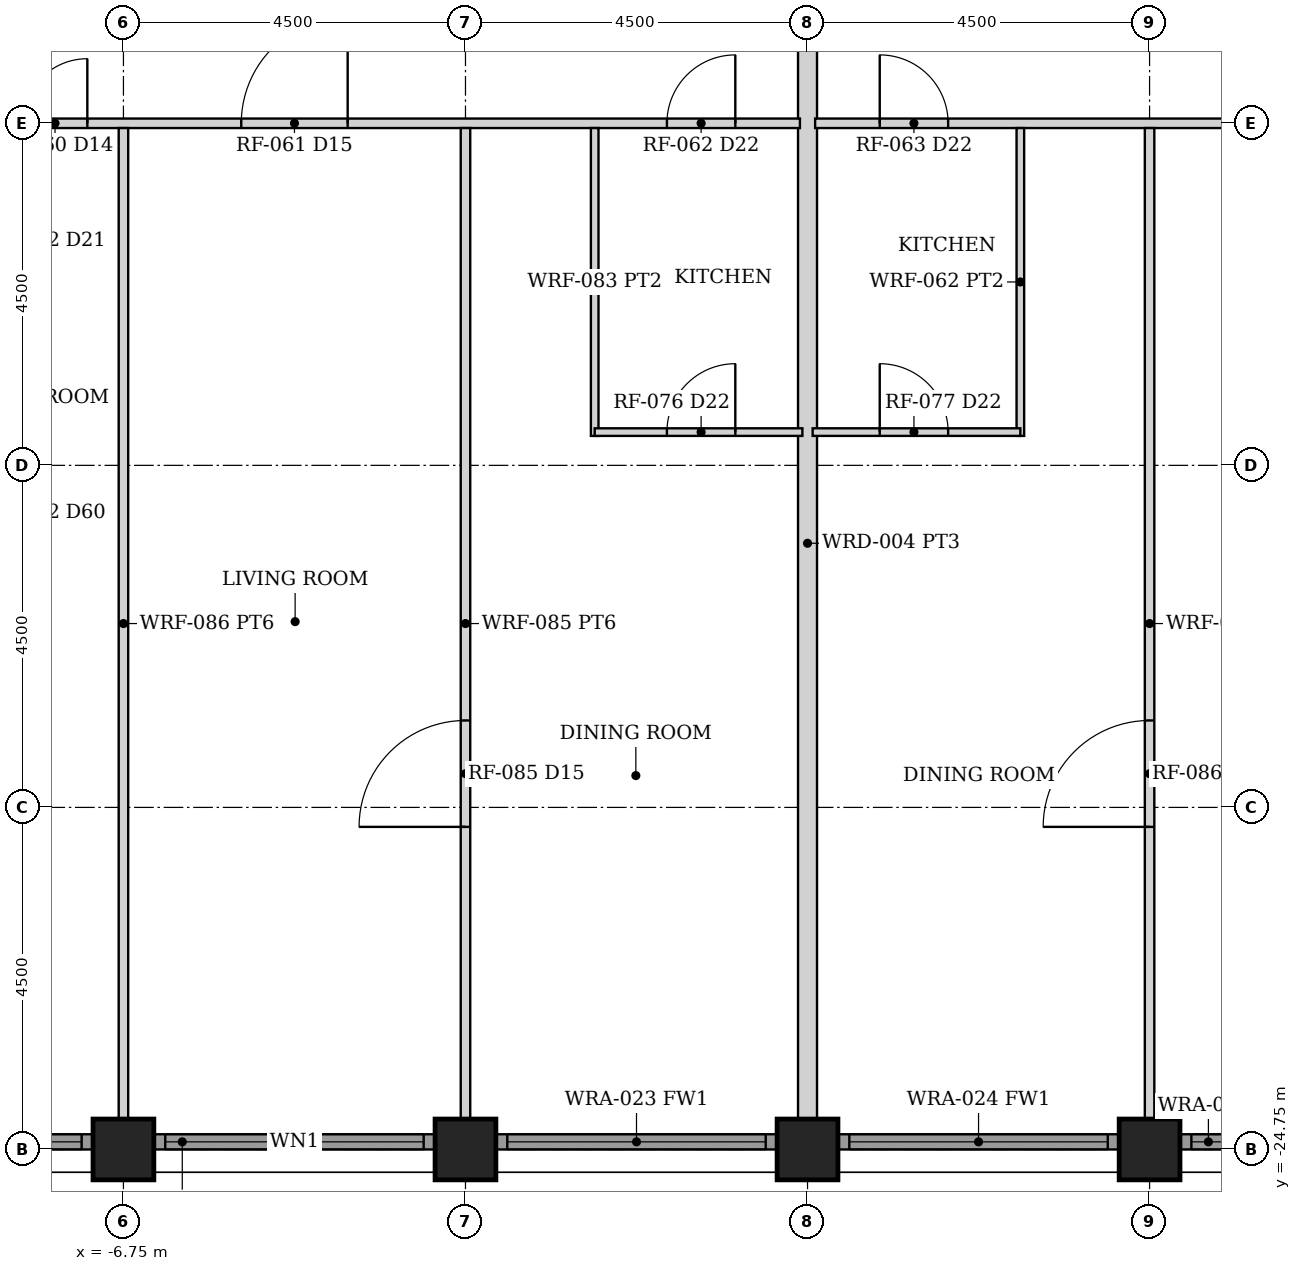
"""IFC4 building model, lengths in metres.
Left out: names, types, materials, properties, quantities, classifications, styles, units other than length and angle.
Written with IfcOpenShell. Run it as: python <this file> out.ifc"""

import sys

from ifc_helpers import new_model, si_unit, direction, frame, frame_2d, origin, origin_2d, place, context, subcontext, project, spatial, rectangle, hollow_rectangle, extrude, element, fill, save


model = new_model("IFC4")
c1 = context("Model", 3, precision=1e-05, world=origin(), true_north=direction((0.0, 1.0)))
c2 = subcontext(c1, "Body", "Model", "MODEL_VIEW")
j1 = project(units=[si_unit("LENGTHUNIT", "METRE"), si_unit("PLANEANGLEUNIT", "RADIAN")], contexts=[c1])
p1 = place(None, origin())
s1 = spatial("IfcSite", under=j1, at=p1, CompositionType="ELEMENT")
p2 = place(p1, origin())
s2 = spatial("IfcBuilding", under=s1, at=p2, CompositionType="ELEMENT")
p3 = place(p2, frame((0.0, 0.0, 79.0)))
s3 = spatial("IfcBuildingStorey", under=s2, at=p3, CompositionType="ELEMENT", Elevation=79.0)
for number, where, z_axis, x_axis in (
    (1, (-6.75, -24.75, 0.0), (0.0, 0.0, 1.0), (0.0, 1.0, 0.0)),
    (2, (-2.25, -24.75, 0.0), (0.0, 0.0, 1.0), (0.0, 1.0, 0.0)),
    (3, (2.25, -24.75, 0.0), (0.0, 0.0, 1.0), (0.0, 1.0, 0.0)),
    (4, (6.75, -24.75, 0.0), (0.0, 0.0, 1.0), (0.0, 1.0, 0.0)),
):
    element("IfcColumn", number, at=place(p3, frame(where, z_axis=z_axis, x_axis=x_axis)), inside=s3, PredefinedType="COLUMN", context=c2, shape_type="SweptSolid", body=[
        extrude(hollow_rectangle(XDim=0.8, YDim=0.8, WallThickness=0.06, at=origin_2d()), origin(), (0.0, 0.0, 1.0), 3.5),
    ])
p4 = place(p3, frame((-10.845, -24.65, 0.0), z_axis=(0.0, 0.0, 1.0), x_axis=(1.0, 0.0, 0.0)))
e5 = element("IfcWall", 5, at=p4, inside=s3, PredefinedType="SOLIDWALL", context=c2, shape_type="SweptSolid", body=[
    extrude(rectangle(XDim=3.69, YDim=0.2, at=frame_2d((1.845, 0.0))), origin(), (0.0, 0.0, 1.0), 2.379),
])
p5 = place(p4, frame((0.145, 0.0, 0.3)))
e6 = element("IfcOpeningElement", 6, at=p5, cuts=e5, PredefinedType="OPENING", context=c2, shape_type="SweptSolid", body=[
    extrude(rectangle(XDim=3.4, YDim=1.929, at=frame_2d((1.7, 0.964))), frame((0.0, 0.11, 0.0), z_axis=(0.0, -1.0, 0.0), x_axis=(1.0, 0.0, 0.0)), (0.0, 0.0, 1.0), 0.22),
])
p6 = place(p3, frame((-6.345, -24.65, 0.0), z_axis=(0.0, 0.0, 1.0), x_axis=(1.0, 0.0, 0.0)))
e7 = element("IfcWall", 7, at=p6, inside=s3, PredefinedType="SOLIDWALL", context=c2, shape_type="SweptSolid", body=[
    extrude(rectangle(XDim=3.69, YDim=0.2, at=frame_2d((1.845, 0.0))), origin(), (0.0, 0.0, 1.0), 2.379),
])
p7 = place(p6, frame((0.145, 0.0, 0.3)))
e8 = element("IfcOpeningElement", 8, at=p7, cuts=e7, PredefinedType="OPENING", context=c2, shape_type="SweptSolid", body=[
    extrude(rectangle(XDim=3.4, YDim=1.929, at=frame_2d((1.7, 0.964))), frame((0.0, 0.11, 0.0), z_axis=(0.0, -1.0, 0.0), x_axis=(1.0, 0.0, 0.0)), (0.0, 0.0, 1.0), 0.22),
])
p8 = place(p3, frame((-1.845, -24.65, 0.0), z_axis=(0.0, 0.0, 1.0), x_axis=(1.0, 0.0, 0.0)))
e9 = element("IfcWall", 9, at=p8, inside=s3, PredefinedType="SOLIDWALL", context=c2, shape_type="SweptSolid", body=[
    extrude(rectangle(XDim=3.69, YDim=0.2, at=frame_2d((1.845, 0.0))), origin(), (0.0, 0.0, 1.0), 2.379),
])
p9 = place(p8, frame((0.145, 0.0, 0.3)))
e10 = element("IfcOpeningElement", 10, at=p9, cuts=e9, PredefinedType="OPENING", context=c2, shape_type="SweptSolid", body=[
    extrude(rectangle(XDim=3.4, YDim=1.929, at=frame_2d((1.7, 0.964))), frame((0.0, 0.11, 0.0), z_axis=(0.0, -1.0, 0.0), x_axis=(1.0, 0.0, 0.0)), (0.0, 0.0, 1.0), 0.22),
])
p10 = place(p3, frame((2.655, -24.65, 0.0), z_axis=(0.0, 0.0, 1.0), x_axis=(1.0, 0.0, 0.0)))
e11 = element("IfcWall", 11, at=p10, inside=s3, PredefinedType="SOLIDWALL", context=c2, shape_type="SweptSolid", body=[
    extrude(rectangle(XDim=3.69, YDim=0.2, at=frame_2d((1.845, 0.0))), origin(), (0.0, 0.0, 1.0), 2.379),
])
p11 = place(p10, frame((0.145, 0.0, 0.3)))
e12 = element("IfcOpeningElement", 12, at=p11, cuts=e11, PredefinedType="OPENING", context=c2, shape_type="SweptSolid", body=[
    extrude(rectangle(XDim=3.4, YDim=1.929, at=frame_2d((1.7, 0.964))), frame((0.0, 0.11, 0.0), z_axis=(0.0, -1.0, 0.0), x_axis=(1.0, 0.0, 0.0)), (0.0, 0.0, 1.0), 0.22),
])
p12 = place(p3, frame((7.155, -24.65, 0.0), z_axis=(0.0, 0.0, 1.0), x_axis=(1.0, 0.0, 0.0)))
e13 = element("IfcWall", 13, at=p12, inside=s3, PredefinedType="SOLIDWALL", context=c2, shape_type="SweptSolid", body=[
    extrude(rectangle(XDim=3.69, YDim=0.2, at=frame_2d((1.845, 0.0))), origin(), (0.0, 0.0, 1.0), 2.379),
])
p13 = place(p12, frame((0.145, 0.0, 0.3)))
e14 = element("IfcOpeningElement", 14, at=p13, cuts=e13, PredefinedType="OPENING", context=c2, shape_type="SweptSolid", body=[
    extrude(rectangle(XDim=3.4, YDim=1.929, at=frame_2d((1.7, 0.964))), frame((0.0, 0.11, 0.0), z_axis=(0.0, -1.0, 0.0), x_axis=(1.0, 0.0, 0.0)), (0.0, 0.0, 1.0), 0.22),
])
p14 = place(p3, frame((2.25, -24.35, 0.0), z_axis=(0.0, 0.0, 1.0), x_axis=(0.0, 1.0, 0.0)))
e15 = element("IfcWall", 15, at=p14, inside=s3, PredefinedType="PARTITIONING", context=c2, shape_type="SweptSolid", body=[
    extrude(rectangle(XDim=15.15, YDim=0.25, at=frame_2d((7.575, 0.0))), origin(), (0.0, 0.0, 1.0), 2.373),
])
p15 = place(p3, frame((-24.35, -11.25, 0.0), z_axis=(0.0, 0.0, 1.0), x_axis=(1.0, 0.0, 0.0)))
e16 = element("IfcWall", 16, at=p15, inside=s3, PredefinedType="PARTITIONING", context=c2, shape_type="SweptSolid", body=[
    extrude(rectangle(XDim=26.5, YDim=0.125, at=frame_2d((13.25, 0.0))), origin(), (0.0, 0.0, 1.0), 2.373),
])
p16 = place(p15, frame((24.75, 0.0, 0.0)))
e17 = element("IfcOpeningElement", 17, at=p16, cuts=e16, PredefinedType="OPENING", context=c2, shape_type="SweptSolid", body=[
    extrude(rectangle(XDim=0.9, YDim=2.1, at=frame_2d((0.45, 1.05))), frame((0.0, 0.073, 0.0), z_axis=(0.0, -1.0, 0.0), x_axis=(1.0, 0.0, 0.0)), (0.0, 0.0, 1.0), 0.145),
])
p17 = place(p15, frame((19.15, 0.0, 0.0)))
e18 = element("IfcOpeningElement", 18, at=p17, cuts=e16, PredefinedType="OPENING", context=c2, shape_type="SweptSolid", body=[
    extrude(rectangle(XDim=1.4, YDim=2.1, at=frame_2d((0.7, 1.05))), frame((0.0, 0.073, 0.0), z_axis=(0.0, -1.0, 0.0), x_axis=(1.0, 0.0, 0.0)), (0.0, 0.0, 1.0), 0.145),
])
p18 = place(p15, frame((16.275, 0.0, 0.0)))
e19 = element("IfcOpeningElement", 19, at=p18, cuts=e16, PredefinedType="OPENING", context=c2, shape_type="SweptSolid", body=[
    extrude(rectangle(XDim=0.85, YDim=2.1, at=frame_2d((0.425, 1.05))), frame((0.0, 0.073, 0.0), z_axis=(0.0, -1.0, 0.0), x_axis=(1.0, 0.0, 0.0)), (0.0, 0.0, 1.0), 0.145),
])
p19 = place(p15, frame((14.03, 0.0, 0.0)))
e20 = element("IfcOpeningElement", 20, at=p19, cuts=e16, PredefinedType="OPENING", context=c2, shape_type="SweptSolid", body=[
    extrude(rectangle(XDim=0.9, YDim=2.1, at=frame_2d((0.45, 1.05))), frame((0.0, 0.073, 0.0), z_axis=(0.0, -1.0, 0.0), x_axis=(1.0, 0.0, 0.0)), (0.0, 0.0, 1.0), 0.145),
])
p20 = place(p15, frame((11.775, 0.0, 0.0)))
e21 = element("IfcOpeningElement", 21, at=p20, cuts=e16, PredefinedType="OPENING", context=c2, shape_type="SweptSolid", body=[
    extrude(rectangle(XDim=0.85, YDim=2.1, at=frame_2d((0.425, 1.05))), frame((0.0, 0.073, 0.0), z_axis=(0.0, -1.0, 0.0), x_axis=(1.0, 0.0, 0.0)), (0.0, 0.0, 1.0), 0.145),
])
p21 = place(p15, frame((7.275, 0.0, 0.0)))
e22 = element("IfcOpeningElement", 22, at=p21, cuts=e16, PredefinedType="OPENING", context=c2, shape_type="SweptSolid", body=[
    extrude(rectangle(XDim=0.85, YDim=2.1, at=frame_2d((0.425, 1.05))), frame((0.0, 0.073, 0.0), z_axis=(0.0, -1.0, 0.0), x_axis=(1.0, 0.0, 0.0)), (0.0, 0.0, 1.0), 0.145),
])
p22 = place(p15, frame((2.775, 0.0, 0.0)))
e23 = element("IfcOpeningElement", 23, at=p22, cuts=e16, PredefinedType="OPENING", context=c2, shape_type="SweptSolid", body=[
    extrude(rectangle(XDim=0.85, YDim=2.1, at=frame_2d((0.425, 1.05))), frame((0.0, 0.073, 0.0), z_axis=(0.0, -1.0, 0.0), x_axis=(1.0, 0.0, 0.0)), (0.0, 0.0, 1.0), 0.145),
])
p23 = place(p3, frame((-0.55, -15.363, 0.0), z_axis=(0.0, 0.0, 1.0), x_axis=(0.0, 1.0, 0.0)))
e24 = element("IfcWall", 24, at=p23, inside=s3, PredefinedType="PARTITIONING", context=c2, shape_type="SweptSolid", body=[
    extrude(rectangle(XDim=4.05, YDim=0.1, at=frame_2d((2.025, 0.0))), origin(), (0.0, 0.0, 1.0), 2.373),
])
p24 = place(p3, frame((-0.55, -15.312, 0.0), z_axis=(0.0, 0.0, 1.0), x_axis=(1.0, 0.0, 0.0)))
e25 = element("IfcWall", 25, at=p24, inside=s3, PredefinedType="PARTITIONING", context=c2, shape_type="SweptSolid", body=[
    extrude(rectangle(XDim=2.733, YDim=0.1, at=frame_2d((1.366, 0.0))), origin(), (0.0, 0.0, 1.0), 2.373),
])
p25 = place(p24, frame((0.95, 0.0, 0.0)))
e26 = element("IfcOpeningElement", 26, at=p25, cuts=e25, PredefinedType="OPENING", context=c2, shape_type="SweptSolid", body=[
    extrude(rectangle(XDim=0.9, YDim=2.1, at=frame_2d((0.45, 1.05))), frame((0.0, 0.06, 0.0), z_axis=(0.0, -1.0, 0.0), x_axis=(1.0, 0.0, 0.0)), (0.0, 0.0, 1.0), 0.12),
])
p26 = place(p3, frame((-2.25, -24.35, 0.0), z_axis=(0.0, 0.0, 1.0), x_axis=(0.0, 1.0, 0.0)))
e27 = element("IfcWall", 27, at=p26, inside=s3, PredefinedType="PARTITIONING", context=c2, shape_type="SweptSolid", body=[
    extrude(rectangle(XDim=13.038, YDim=0.125, at=frame_2d((6.519, 0.0))), origin(), (0.0, 0.0, 1.0), 2.373),
])
p27 = place(p26, frame((3.844, 0.0, 0.0)))
e28 = element("IfcOpeningElement", 28, at=p27, cuts=e27, PredefinedType="OPENING", context=c2, shape_type="SweptSolid", body=[
    extrude(rectangle(XDim=1.4, YDim=2.1, at=frame_2d((0.7, 1.05))), frame((0.0, 0.073, 0.0), z_axis=(0.0, -1.0, 0.0), x_axis=(1.0, 0.0, 0.0)), (0.0, 0.0, 1.0), 0.145),
])
p28 = place(p3, frame((-6.75, -24.35, 0.0), z_axis=(0.0, 0.0, 1.0), x_axis=(0.0, 1.0, 0.0)))
e29 = element("IfcWall", 29, at=p28, inside=s3, PredefinedType="PARTITIONING", context=c2, shape_type="SweptSolid", body=[
    extrude(rectangle(XDim=13.038, YDim=0.125, at=frame_2d((6.519, 0.0))), origin(), (0.0, 0.0, 1.0), 2.373),
])
p29 = place(p3, frame((2.35, -11.25, 0.0), z_axis=(0.0, 0.0, 1.0), x_axis=(1.0, 0.0, 0.0)))
e30 = element("IfcWall", 30, at=p29, inside=s3, PredefinedType="PARTITIONING", context=c2, shape_type="SweptSolid", body=[
    extrude(rectangle(XDim=22.0, YDim=0.125, at=frame_2d((11.0, 0.0))), origin(), (0.0, 0.0, 1.0), 2.373),
])
p30 = place(p29, frame((0.85, 0.0, 0.0)))
e31 = element("IfcOpeningElement", 31, at=p30, cuts=e30, PredefinedType="OPENING", context=c2, shape_type="SweptSolid", body=[
    extrude(rectangle(XDim=0.9, YDim=2.1, at=frame_2d((0.45, 1.05))), frame((0.0, 0.073, 0.0), z_axis=(0.0, -1.0, 0.0), x_axis=(1.0, 0.0, 0.0)), (0.0, 0.0, 1.0), 0.145),
])
p31 = place(p29, frame((5.95, 0.0, 0.0)))
e32 = element("IfcOpeningElement", 32, at=p31, cuts=e30, PredefinedType="OPENING", context=c2, shape_type="SweptSolid", body=[
    extrude(rectangle(XDim=1.4, YDim=2.1, at=frame_2d((0.7, 1.05))), frame((0.0, 0.073, 0.0), z_axis=(0.0, -1.0, 0.0), x_axis=(1.0, 0.0, 0.0)), (0.0, 0.0, 1.0), 0.145),
])
p32 = place(p29, frame((9.375, 0.0, 0.0)))
e33 = element("IfcOpeningElement", 33, at=p32, cuts=e30, PredefinedType="OPENING", context=c2, shape_type="SweptSolid", body=[
    extrude(rectangle(XDim=0.85, YDim=2.1, at=frame_2d((0.425, 1.05))), frame((0.0, 0.073, 0.0), z_axis=(0.0, -1.0, 0.0), x_axis=(1.0, 0.0, 0.0)), (0.0, 0.0, 1.0), 0.145),
])
p33 = place(p29, frame((11.57, 0.0, 0.0)))
e34 = element("IfcOpeningElement", 34, at=p33, cuts=e30, PredefinedType="OPENING", context=c2, shape_type="SweptSolid", body=[
    extrude(rectangle(XDim=0.9, YDim=2.1, at=frame_2d((0.45, 1.05))), frame((0.0, 0.073, 0.0), z_axis=(0.0, -1.0, 0.0), x_axis=(1.0, 0.0, 0.0)), (0.0, 0.0, 1.0), 0.145),
])
p34 = place(p29, frame((13.875, 0.0, 0.0)))
e35 = element("IfcOpeningElement", 35, at=p34, cuts=e30, PredefinedType="OPENING", context=c2, shape_type="SweptSolid", body=[
    extrude(rectangle(XDim=0.85, YDim=2.1, at=frame_2d((0.425, 1.05))), frame((0.0, 0.073, 0.0), z_axis=(0.0, -1.0, 0.0), x_axis=(1.0, 0.0, 0.0)), (0.0, 0.0, 1.0), 0.145),
])
p35 = place(p29, frame((18.375, 0.0, 0.0)))
e36 = element("IfcOpeningElement", 36, at=p35, cuts=e30, PredefinedType="OPENING", context=c2, shape_type="SweptSolid", body=[
    extrude(rectangle(XDim=0.85, YDim=2.1, at=frame_2d((0.425, 1.05))), frame((0.0, 0.073, 0.0), z_axis=(0.0, -1.0, 0.0), x_axis=(1.0, 0.0, 0.0)), (0.0, 0.0, 1.0), 0.145),
])
p36 = place(p3, frame((5.05, -15.363, 0.0), z_axis=(0.0, 0.0, 1.0), x_axis=(0.0, 1.0, 0.0)))
e37 = element("IfcWall", 37, at=p36, inside=s3, PredefinedType="PARTITIONING", context=c2, shape_type="SweptSolid", body=[
    extrude(rectangle(XDim=4.05, YDim=0.1, at=frame_2d((2.025, 0.0))), origin(), (0.0, 0.0, 1.0), 2.373),
])
p37 = place(p3, frame((2.317, -15.312, 0.0), z_axis=(0.0, 0.0, 1.0), x_axis=(1.0, 0.0, 0.0)))
e38 = element("IfcWall", 38, at=p37, inside=s3, PredefinedType="PARTITIONING", context=c2, shape_type="SweptSolid", body=[
    extrude(rectangle(XDim=2.733, YDim=0.1, at=frame_2d((1.366, 0.0))), origin(), (0.0, 0.0, 1.0), 2.373),
])
p38 = place(p37, frame((0.883, 0.0, 0.0)))
e39 = element("IfcOpeningElement", 39, at=p38, cuts=e38, PredefinedType="OPENING", context=c2, shape_type="SweptSolid", body=[
    extrude(rectangle(XDim=0.9, YDim=2.1, at=frame_2d((0.45, 1.05))), frame((0.0, 0.06, 0.0), z_axis=(0.0, -1.0, 0.0), x_axis=(1.0, 0.0, 0.0)), (0.0, 0.0, 1.0), 0.12),
])
p39 = place(p3, frame((6.75, -24.35, 0.0), z_axis=(0.0, 0.0, 1.0), x_axis=(0.0, 1.0, 0.0)))
e40 = element("IfcWall", 40, at=p39, inside=s3, PredefinedType="PARTITIONING", context=c2, shape_type="SweptSolid", body=[
    extrude(rectangle(XDim=13.038, YDim=0.125, at=frame_2d((6.519, 0.0))), origin(), (0.0, 0.0, 1.0), 2.373),
])
p40 = place(p39, frame((3.844, 0.0, 0.0)))
e41 = element("IfcOpeningElement", 41, at=p40, cuts=e40, PredefinedType="OPENING", context=c2, shape_type="SweptSolid", body=[
    extrude(rectangle(XDim=1.4, YDim=2.1, at=frame_2d((0.7, 1.05))), frame((0.0, 0.073, 0.0), z_axis=(0.0, -1.0, 0.0), x_axis=(1.0, 0.0, 0.0)), (0.0, 0.0, 1.0), 0.145),
])
p41 = place(p5, origin())
e42 = element("IfcWindow", 42, at=p41, inside=s3, PartitioningType="SINGLE_PANEL", PredefinedType="WINDOW", context=c2, shape_type="SweptSolid", body=[
    extrude(rectangle(XDim=3.4, YDim=1.929, at=frame_2d((1.7, 0.964))), frame((0.0, 0.03, 0.0), z_axis=(0.0, -1.0, 0.0), x_axis=(1.0, 0.0, 0.0)), (0.0, 0.0, 1.0), 0.06),
])
fill(e6, e42)
p42 = place(p7, origin())
e43 = element("IfcWindow", 43, at=p42, inside=s3, PartitioningType="SINGLE_PANEL", PredefinedType="WINDOW", context=c2, shape_type="SweptSolid", body=[
    extrude(rectangle(XDim=3.4, YDim=1.929, at=frame_2d((1.7, 0.964))), frame((0.0, 0.03, 0.0), z_axis=(0.0, -1.0, 0.0), x_axis=(1.0, 0.0, 0.0)), (0.0, 0.0, 1.0), 0.06),
])
fill(e8, e43)
p43 = place(p9, origin())
e44 = element("IfcWindow", 44, at=p43, inside=s3, PartitioningType="SINGLE_PANEL", PredefinedType="WINDOW", context=c2, shape_type="SweptSolid", body=[
    extrude(rectangle(XDim=3.4, YDim=1.929, at=frame_2d((1.7, 0.964))), frame((0.0, 0.03, 0.0), z_axis=(0.0, -1.0, 0.0), x_axis=(1.0, 0.0, 0.0)), (0.0, 0.0, 1.0), 0.06),
])
fill(e10, e44)
p44 = place(p11, origin())
e45 = element("IfcWindow", 45, at=p44, inside=s3, PartitioningType="SINGLE_PANEL", PredefinedType="WINDOW", context=c2, shape_type="SweptSolid", body=[
    extrude(rectangle(XDim=3.4, YDim=1.929, at=frame_2d((1.7, 0.964))), frame((0.0, 0.03, 0.0), z_axis=(0.0, -1.0, 0.0), x_axis=(1.0, 0.0, 0.0)), (0.0, 0.0, 1.0), 0.06),
])
fill(e12, e45)
p45 = place(p13, origin())
e46 = element("IfcWindow", 46, at=p45, inside=s3, PartitioningType="SINGLE_PANEL", PredefinedType="WINDOW", context=c2, shape_type="SweptSolid", body=[
    extrude(rectangle(XDim=3.4, YDim=1.929, at=frame_2d((1.7, 0.964))), frame((0.0, 0.03, 0.0), z_axis=(0.0, -1.0, 0.0), x_axis=(1.0, 0.0, 0.0)), (0.0, 0.0, 1.0), 0.06),
])
fill(e14, e46)
p46 = place(p16, origin())
e47 = element("IfcDoor", 47, at=p46, inside=s3, OperationType="SINGLE_SWING_RIGHT", PredefinedType="DOOR", context=c2, shape_type="SweptSolid", body=[
    extrude(rectangle(XDim=0.9, YDim=2.1, at=frame_2d((0.45, 1.05))), frame((0.0, 0.025, 0.0), z_axis=(0.0, -1.0, 0.0), x_axis=(1.0, 0.0, 0.0)), (0.0, 0.0, 1.0), 0.05),
])
fill(e17, e47)
p47 = place(p17, origin())
e48 = element("IfcDoor", 48, at=p47, inside=s3, OperationType="SINGLE_SWING_RIGHT", PredefinedType="DOOR", context=c2, shape_type="SweptSolid", body=[
    extrude(rectangle(XDim=1.4, YDim=2.1, at=frame_2d((0.7, 1.05))), frame((0.0, 0.025, 0.0), z_axis=(0.0, -1.0, 0.0), x_axis=(1.0, 0.0, 0.0)), (0.0, 0.0, 1.0), 0.05),
])
fill(e18, e48)
p48 = place(p27, origin())
e49 = element("IfcDoor", 49, at=p48, inside=s3, OperationType="SINGLE_SWING_LEFT", PredefinedType="DOOR", context=c2, shape_type="SweptSolid", body=[
    extrude(rectangle(XDim=1.4, YDim=2.1, at=frame_2d((0.7, 1.05))), frame((0.0, 0.025, 0.0), z_axis=(0.0, -1.0, 0.0), x_axis=(1.0, 0.0, 0.0)), (0.0, 0.0, 1.0), 0.05),
])
fill(e28, e49)
p49 = place(p25, origin())
e50 = element("IfcDoor", 50, at=p49, inside=s3, OperationType="SINGLE_SWING_RIGHT", PredefinedType="DOOR", context=c2, shape_type="SweptSolid", body=[
    extrude(rectangle(XDim=0.9, YDim=2.1, at=frame_2d((0.45, 1.05))), frame((0.0, 0.025, 0.0), z_axis=(0.0, -1.0, 0.0), x_axis=(1.0, 0.0, 0.0)), (0.0, 0.0, 1.0), 0.05),
])
fill(e26, e50)
p50 = place(p18, origin())
e51 = element("IfcDoor", 51, at=p50, inside=s3, OperationType="SINGLE_SWING_RIGHT", PredefinedType="DOOR", context=c2, shape_type="SweptSolid", body=[
    extrude(rectangle(XDim=0.85, YDim=2.1, at=frame_2d((0.425, 1.05))), frame((0.0, 0.025, 0.0), z_axis=(0.0, -1.0, 0.0), x_axis=(1.0, 0.0, 0.0)), (0.0, 0.0, 1.0), 0.05),
])
fill(e19, e51)
p51 = place(p30, origin())
e52 = element("IfcDoor", 52, at=p51, inside=s3, OperationType="SINGLE_SWING_LEFT", PredefinedType="DOOR", context=c2, shape_type="SweptSolid", body=[
    extrude(rectangle(XDim=0.9, YDim=2.1, at=frame_2d((0.45, 1.05))), frame((0.0, 0.025, 0.0), z_axis=(0.0, -1.0, 0.0), x_axis=(1.0, 0.0, 0.0)), (0.0, 0.0, 1.0), 0.05),
])
fill(e31, e52)
p52 = place(p40, origin())
e53 = element("IfcDoor", 53, at=p52, inside=s3, OperationType="SINGLE_SWING_LEFT", PredefinedType="DOOR", context=c2, shape_type="SweptSolid", body=[
    extrude(rectangle(XDim=1.4, YDim=2.1, at=frame_2d((0.7, 1.05))), frame((0.0, 0.025, 0.0), z_axis=(0.0, -1.0, 0.0), x_axis=(1.0, 0.0, 0.0)), (0.0, 0.0, 1.0), 0.05),
])
fill(e41, e53)
p53 = place(p38, origin())
e54 = element("IfcDoor", 54, at=p53, inside=s3, OperationType="SINGLE_SWING_LEFT", PredefinedType="DOOR", context=c2, shape_type="SweptSolid", body=[
    extrude(rectangle(XDim=0.9, YDim=2.1, at=frame_2d((0.45, 1.05))), frame((0.0, 0.025, 0.0), z_axis=(0.0, -1.0, 0.0), x_axis=(1.0, 0.0, 0.0)), (0.0, 0.0, 1.0), 0.05),
])
fill(e39, e54)
save(model, sys.argv[1])
